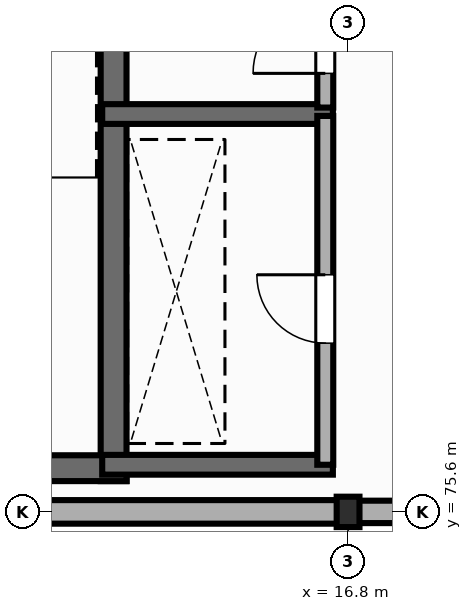
"""IFC4 building model, lengths in metres.
Left out: names, types, materials, properties, quantities, classifications, styles, units other than length and angle.
Written with IfcOpenShell. Run it as: python <this file> out.ifc"""

import sys

from ifc_helpers import new_model, si_unit, direction, frame, frame_2d, origin, origin_2d, place, context, subcontext, project, spatial, rectangle, i_section, extrude, element, fill, save


model = new_model("IFC4")
c1 = context("Model", 3, precision=1e-05, world=origin(), true_north=direction((0.0, 1.0)))
c2 = subcontext(c1, "Body", "Model", "MODEL_VIEW")
j1 = project(units=[si_unit("LENGTHUNIT", "METRE"), si_unit("PLANEANGLEUNIT", "RADIAN")], contexts=[c1])
p1 = place(None, origin())
s1 = spatial("IfcSite", under=j1, at=p1, CompositionType="ELEMENT")
p2 = place(p1, origin())
s2 = spatial("IfcBuilding", under=s1, at=p2, CompositionType="ELEMENT")
p3 = place(p2, frame((0.0, 0.0, 9.9)))
s3 = spatial("IfcBuildingStorey", under=s2, at=p3, CompositionType="ELEMENT", Elevation=9.9)
p4 = place(p3, frame((16.8, 75.6, 0.0), z_axis=(0.0, 0.0, 1.0), x_axis=(1.0, 0.0, 0.0)))
e1 = element("IfcColumn", 1, at=p4, inside=s3, PredefinedType="COLUMN", context=c2, shape_type="SweptSolid", body=[
    extrude(i_section(OverallWidth=0.3, OverallDepth=0.4, WebThickness=0.013, FlangeThickness=0.024, FilletRadius=0.027, at=origin_2d()), origin(), (0.0, 0.0, 1.0), 4.05),
])
p5 = place(p3, frame((8.408, 75.6, 0.0), z_axis=(0.0, 0.0, 1.0), x_axis=(1.0, 0.0, 0.0)))
e2 = element("IfcWall", 2, at=p5, inside=s3, PredefinedType="STANDARD", context=c2, shape_type="SweptSolid", body=[
    extrude(rectangle(XDim=8.384, YDim=0.31, at=frame_2d((4.192, 0.0))), origin(), (0.0, 0.0, 1.0), 3.472),
])
p6 = place(p3, frame((16.808, 75.6, 0.0), z_axis=(0.0, 0.0, 1.0), x_axis=(1.0, 0.0, 0.0)))
e3 = element("IfcWall", 3, at=p6, inside=s3, PredefinedType="STANDARD", context=c2, shape_type="SweptSolid", body=[
    extrude(rectangle(XDim=8.384, YDim=0.295, at=frame_2d((4.192, 0.0))), origin(), (0.0, 0.0, 1.0), 3.502),
])
p7 = place(p3, frame((13.715, 76.005, 0.0), z_axis=(0.0, 0.0, 1.0), x_axis=(0.0, 1.0, 0.0)))
e4 = element("IfcWall", 4, at=p7, inside=s3, PredefinedType="SHEAR", context=c2, shape_type="SweptSolid", body=[
    extrude(rectangle(XDim=9.99, YDim=0.34, at=frame_2d((4.995, 0.0))), origin(), (0.0, 0.0, 1.0), 3.84),
])
p8 = place(p3, frame((8.635, 76.175, 0.0), z_axis=(0.0, 0.0, 1.0), x_axis=(1.0, 0.0, 0.0)))
e5 = element("IfcWall", 5, at=p8, inside=s3, PredefinedType="SHEAR", context=c2, shape_type="SweptSolid", body=[
    extrude(rectangle(XDim=5.25, YDim=0.34, at=frame_2d((2.625, 0.0))), origin(), (0.0, 0.0, 1.0), 3.84),
])
for number, where, z_axis, x_axis in (
    (6, (13.565, 76.22, 0.0), (0.0, 0.0, 1.0), (1.0, 0.0, 0.0)),
    (7, (13.565, 80.835, 0.0), (0.0, 0.0, 1.0), (1.0, 0.0, 0.0)),
):
    element("IfcWall", number, at=place(p3, frame(where, z_axis=z_axis, x_axis=x_axis)), inside=s3, PredefinedType="SHEAR", context=c2, shape_type="SweptSolid", body=[
        extrude(rectangle(XDim=3.035, YDim=0.26, at=frame_2d((1.518, 0.0))), origin(), (0.0, 0.0, 1.0), 3.84),
    ])
p9 = place(p3, frame((16.5, 76.22, 0.0), z_axis=(0.0, 0.0, 1.0), x_axis=(0.0, 1.0, 0.0)))
e8 = element("IfcWall", 8, at=p9, inside=s3, PredefinedType="STANDARD", context=c2, shape_type="SweptSolid", body=[
    extrude(rectangle(XDim=4.59, YDim=0.21, at=frame_2d((2.295, 0.0))), origin(), (0.0, 0.0, 1.0), 3.232),
])
p10 = place(p9, frame((1.6, 0.0, 0.0)))
e9 = element("IfcOpeningElement", 9, at=p10, cuts=e8, PredefinedType="OPENING", context=c2, shape_type="SweptSolid", body=[
    extrude(rectangle(XDim=0.9, YDim=2.1, at=frame_2d((0.45, 1.05))), frame((0.0, 0.115, 0.0), z_axis=(0.0, -1.0, 0.0), x_axis=(1.0, 0.0, 0.0)), (0.0, 0.0, 1.0), 0.23),
])
p11 = place(p3, frame((16.5, 80.92, 0.0), z_axis=(0.0, 0.0, 1.0), x_axis=(0.0, 1.0, 0.0)))
e10 = element("IfcWall", 10, at=p11, inside=s3, PredefinedType="STANDARD", context=c2, shape_type="SweptSolid", body=[
    extrude(rectangle(XDim=4.48, YDim=0.21, at=frame_2d((2.24, 0.0))), origin(), (0.0, 0.0, 1.0), 3.232),
])
p12 = place(p11, frame((0.45, 0.0, 0.0)))
e11 = element("IfcOpeningElement", 11, at=p12, cuts=e10, PredefinedType="OPENING", context=c2, shape_type="SweptSolid", body=[
    extrude(rectangle(XDim=0.95, YDim=2.15, at=frame_2d((0.475, 1.075))), frame((0.0, 0.115, 0.0), z_axis=(0.0, -1.0, 0.0), x_axis=(1.0, 0.0, 0.0)), (0.0, 0.0, 1.0), 0.23),
])
p13 = place(p10, origin())
e12 = element("IfcDoor", 12, at=p13, inside=s3, OperationType="SINGLE_SWING_RIGHT", PredefinedType="DOOR", context=c2, shape_type="SweptSolid", body=[
    extrude(rectangle(XDim=0.9, YDim=2.1, at=frame_2d((0.45, 1.05))), frame((0.0, 0.025, 0.0), z_axis=(0.0, -1.0, 0.0), x_axis=(1.0, 0.0, 0.0)), (0.0, 0.0, 1.0), 0.05),
])
fill(e9, e12)
p14 = place(p12, origin())
e13 = element("IfcDoor", 13, at=p14, inside=s3, OperationType="SINGLE_SWING_LEFT", PredefinedType="DOOR", context=c2, shape_type="SweptSolid", body=[
    extrude(rectangle(XDim=0.95, YDim=2.15, at=frame_2d((0.475, 1.075))), frame((0.0, 0.025, 0.0), z_axis=(0.0, -1.0, 0.0), x_axis=(1.0, 0.0, 0.0)), (0.0, 0.0, 1.0), 0.05),
])
fill(e11, e13)
save(model, sys.argv[1])
